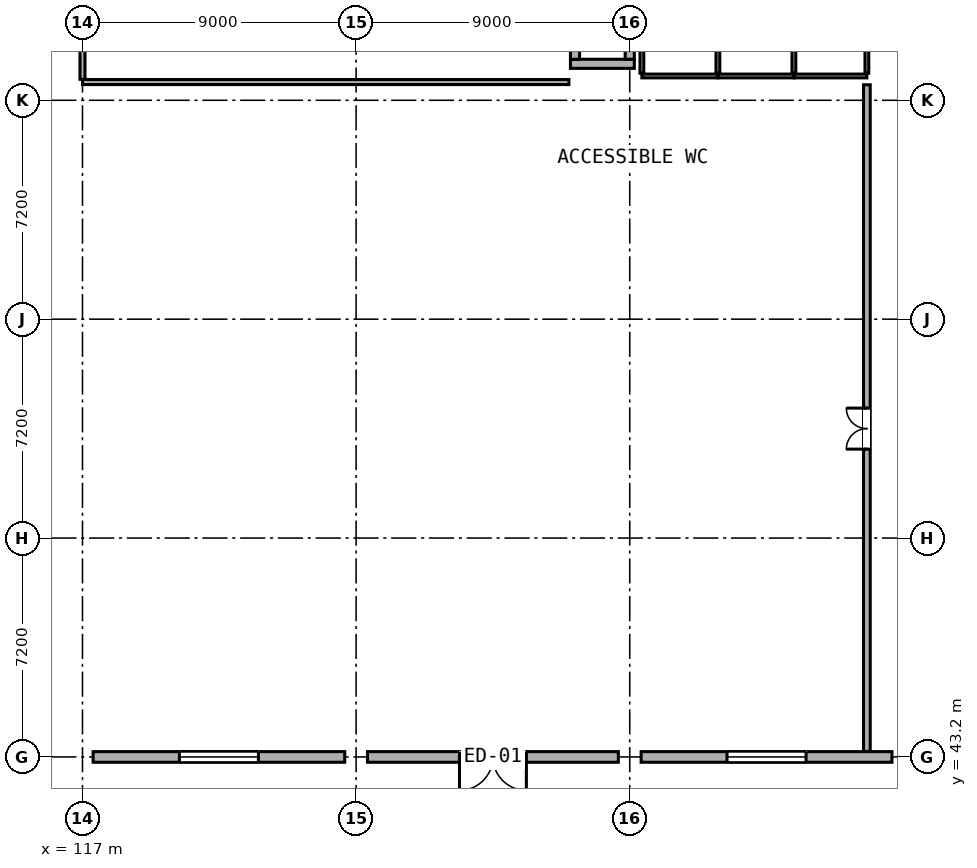
"""IFC4 building model, lengths in metres.
Left out: names, types, materials, properties, quantities, classifications, styles, units other than length and angle.
Written with IfcOpenShell. Run it as: python <this file> out.ifc"""

import sys

from ifc_helpers import new_model, si_unit, direction, frame, frame_2d, origin, origin_2d, place, context, subcontext, project, spatial, rectangle, hollow_rectangle, extrude, element, fill, save


model = new_model("IFC4")
c1 = context("Model", 3, precision=1e-05, world=origin(), true_north=direction((0.0, 1.0)))
c2 = subcontext(c1, "Body", "Model", "MODEL_VIEW")
j1 = project(units=[si_unit("LENGTHUNIT", "METRE"), si_unit("PLANEANGLEUNIT", "RADIAN")], contexts=[c1])
p1 = place(None, origin())
s1 = spatial("IfcSite", under=j1, at=p1, CompositionType="ELEMENT")
p2 = place(p1, origin())
s2 = spatial("IfcBuilding", under=s1, at=p2, CompositionType="ELEMENT")
p3 = place(p2, origin())
s3 = spatial("IfcBuildingStorey", under=s2, at=p3, CompositionType="ELEMENT", Elevation=0.0)
for number, where, z_axis, x_axis in (
    (1, (117.0, 43.2, 0.0), (0.0, 0.0, 1.0), (1.0, 0.0, 0.0)),
    (2, (117.0, 50.4, 0.0), (0.0, 0.0, 1.0), (1.0, 0.0, 0.0)),
    (3, (117.0, 57.6, 0.0), (0.0, 0.0, 1.0), (1.0, 0.0, 0.0)),
    (4, (117.0, 64.8, 0.0), (0.0, 0.0, 1.0), (1.0, 0.0, 0.0)),
):
    element("IfcColumn", number, at=place(p3, frame(where, z_axis=z_axis, x_axis=x_axis)), inside=s3, PredefinedType="COLUMN", context=c2, shape_type="SweptSolid", body=[
        extrude(hollow_rectangle(XDim=0.7, YDim=0.7, WallThickness=0.028, at=origin_2d()), origin(), (0.0, 0.0, 1.0), 4.8),
    ])
for number, where, z_axis, x_axis in (
    (5, (126.0, 43.2, 0.0), (0.0, 0.0, 1.0), (1.0, 0.0, 0.0)),
    (6, (126.0, 50.4, 0.0), (0.0, 0.0, 1.0), (1.0, 0.0, 0.0)),
    (7, (126.0, 57.6, 0.0), (0.0, 0.0, 1.0), (1.0, 0.0, 0.0)),
    (8, (126.0, 64.8, 0.0), (0.0, 0.0, 1.0), (1.0, 0.0, 0.0)),
    (9, (135.0, 43.2, 0.0), (0.0, 0.0, 1.0), (1.0, 0.0, 0.0)),
    (10, (135.0, 50.4, 0.0), (0.0, 0.0, 1.0), (1.0, 0.0, 0.0)),
    (11, (135.0, 57.6, 0.0), (0.0, 0.0, 1.0), (1.0, 0.0, 0.0)),
    (12, (135.0, 64.8, 0.0), (0.0, 0.0, 1.0), (1.0, 0.0, 0.0)),
    (13, (144.0, 43.2, 0.0), (0.0, 0.0, 1.0), (1.0, 0.0, 0.0)),
    (14, (144.0, 50.4, 0.0), (0.0, 0.0, 1.0), (1.0, 0.0, 0.0)),
    (15, (144.0, 57.6, 0.0), (0.0, 0.0, 1.0), (1.0, 0.0, 0.0)),
    (16, (144.0, 64.8, 0.0), (0.0, 0.0, 1.0), (1.0, 0.0, 0.0)),
):
    element("IfcColumn", number, at=place(p3, frame(where, z_axis=z_axis, x_axis=x_axis)), inside=s3, PredefinedType="COLUMN", context=c2, shape_type="SweptSolid", body=[
        extrude(hollow_rectangle(XDim=0.75, YDim=0.75, WallThickness=0.032, at=origin_2d()), origin(), (0.0, 0.0, 1.0), 4.8),
    ])
p4 = place(p3, frame((117.35, 43.2, 0.0), z_axis=(0.0, 0.0, 1.0), x_axis=(1.0, 0.0, 0.0)))
e17 = element("IfcWall", 17, at=p4, inside=s3, PredefinedType="STANDARD", context=c2, shape_type="SweptSolid", body=[
    extrude(rectangle(XDim=8.275, YDim=0.35, at=frame_2d((4.137, 0.0))), origin(), (0.0, 0.0, 1.0), 4.055),
])
p5 = place(p4, frame((2.837, 0.0, 0.85)))
e18 = element("IfcOpeningElement", 18, at=p5, cuts=e17, PredefinedType="OPENING", context=c2, shape_type="SweptSolid", body=[
    extrude(rectangle(XDim=2.6, YDim=1.6, at=frame_2d((1.3, 0.8))), frame((0.0, 0.187, 0.0), z_axis=(0.0, -1.0, 0.0), x_axis=(1.0, 0.0, 0.0)), (0.0, 0.0, 1.0), 0.374),
])
p6 = place(p3, frame((126.375, 43.2, 0.0), z_axis=(0.0, 0.0, 1.0), x_axis=(1.0, 0.0, 0.0)))
e19 = element("IfcWall", 19, at=p6, inside=s3, PredefinedType="STANDARD", context=c2, shape_type="SweptSolid", body=[
    extrude(rectangle(XDim=8.25, YDim=0.35, at=frame_2d((4.125, 0.0))), origin(), (0.0, 0.0, 1.0), 4.055),
])
p7 = place(p6, frame((3.025, 0.0, 0.0)))
e20 = element("IfcOpeningElement", 20, at=p7, cuts=e19, PredefinedType="OPENING", context=c2, shape_type="SweptSolid", body=[
    extrude(rectangle(XDim=2.2, YDim=2.5, at=frame_2d((1.1, 1.25))), frame((0.0, 0.187, 0.0), z_axis=(0.0, -1.0, 0.0), x_axis=(1.0, 0.0, 0.0)), (0.0, 0.0, 1.0), 0.374),
])
p8 = place(p3, frame((135.375, 43.2, 0.0), z_axis=(0.0, 0.0, 1.0), x_axis=(1.0, 0.0, 0.0)))
e21 = element("IfcWall", 21, at=p8, inside=s3, PredefinedType="STANDARD", context=c2, shape_type="SweptSolid", body=[
    extrude(rectangle(XDim=8.25, YDim=0.35, at=frame_2d((4.125, 0.0))), origin(), (0.0, 0.0, 1.0), 4.055),
])
p9 = place(p8, frame((2.825, 0.0, 0.85)))
e22 = element("IfcOpeningElement", 22, at=p9, cuts=e21, PredefinedType="OPENING", context=c2, shape_type="SweptSolid", body=[
    extrude(rectangle(XDim=2.6, YDim=1.6, at=frame_2d((1.3, 0.8))), frame((0.0, 0.187, 0.0), z_axis=(0.0, -1.0, 0.0), x_axis=(1.0, 0.0, 0.0)), (0.0, 0.0, 1.0), 0.374),
])
p10 = place(p3, frame((133.05, 66.0, 0.0), z_axis=(0.0, 0.0, 1.0), x_axis=(1.0, 0.0, 0.0)))
e23 = element("IfcWall", 23, at=p10, inside=s3, PredefinedType="SHEAR", context=c2, shape_type="SweptSolid", body=[
    extrude(rectangle(XDim=2.1, YDim=0.3, at=frame_2d((1.05, 0.0))), origin(), (0.0, 0.0, 1.0), 4.555),
])
for number, where, z_axis, x_axis in (
    (24, (133.2, 66.15, 0.0), (0.0, 0.0, 1.0), (0.0, 1.0, 0.0)),
    (25, (135.0, 66.15, 0.0), (0.0, 0.0, 1.0), (0.0, 1.0, 0.0)),
):
    element("IfcWall", number, at=place(p3, frame(where, z_axis=z_axis, x_axis=x_axis)), inside=s3, PredefinedType="SHEAR", context=c2, shape_type="SweptSolid", body=[
        extrude(rectangle(XDim=1.9, YDim=0.3, at=frame_2d((0.95, 0.0))), origin(), (0.0, 0.0, 1.0), 4.555),
    ])
p11 = place(p3, frame((135.4, 65.6, 0.0), z_axis=(0.0, 0.0, 1.0), x_axis=(1.0, 0.0, 0.0)))
e26 = element("IfcWall", 26, at=p11, inside=s3, PredefinedType="PARTITIONING", context=c2, shape_type="SweptSolid", body=[
    extrude(rectangle(XDim=2.5, YDim=0.125, at=frame_2d((1.25, 0.0))), origin(), (0.0, 0.0, 1.0), 4.555),
])
for number, where, z_axis, x_axis in (
    (27, (135.4, 65.69, 0.0), (0.0, 0.0, 1.0), (0.0, 1.0, 0.0)),
    (28, (137.9, 65.69, 0.0), (0.0, 0.0, 1.0), (0.0, 1.0, 0.0)),
):
    element("IfcWall", number, at=place(p3, frame(where, z_axis=z_axis, x_axis=x_axis)), inside=s3, PredefinedType="PARTITIONING", context=c2, shape_type="SweptSolid", body=[
        extrude(rectangle(XDim=3.42, YDim=0.125, at=frame_2d((1.71, 0.0))), origin(), (0.0, 0.0, 1.0), 4.555),
    ])
p12 = place(p3, frame((137.9, 65.6, 0.0), z_axis=(0.0, 0.0, 1.0), x_axis=(1.0, 0.0, 0.0)))
e29 = element("IfcWall", 29, at=p12, inside=s3, PredefinedType="PARTITIONING", context=c2, shape_type="SweptSolid", body=[
    extrude(rectangle(XDim=2.5, YDim=0.125, at=frame_2d((1.25, 0.0))), origin(), (0.0, 0.0, 1.0), 4.555),
])
p13 = place(p3, frame((140.4, 65.69, 0.0), z_axis=(0.0, 0.0, 1.0), x_axis=(0.0, 1.0, 0.0)))
e30 = element("IfcWall", 30, at=p13, inside=s3, PredefinedType="PARTITIONING", context=c2, shape_type="SweptSolid", body=[
    extrude(rectangle(XDim=3.42, YDim=0.125, at=frame_2d((1.71, 0.0))), origin(), (0.0, 0.0, 1.0), 4.555),
])
p14 = place(p3, frame((140.4, 65.6, 0.0), z_axis=(0.0, 0.0, 1.0), x_axis=(1.0, 0.0, 0.0)))
e31 = element("IfcWall", 31, at=p14, inside=s3, PredefinedType="PARTITIONING", context=c2, shape_type="SweptSolid", body=[
    extrude(rectangle(XDim=2.4, YDim=0.125, at=frame_2d((1.2, 0.0))), origin(), (0.0, 0.0, 1.0), 4.555),
])
p15 = place(p3, frame((142.8, 65.69, 0.0), z_axis=(0.0, 0.0, 1.0), x_axis=(0.0, 1.0, 0.0)))
e32 = element("IfcWall", 32, at=p15, inside=s3, PredefinedType="PARTITIONING", context=c2, shape_type="SweptSolid", body=[
    extrude(rectangle(XDim=3.42, YDim=0.125, at=frame_2d((1.71, 0.0))), origin(), (0.0, 0.0, 1.0), 4.555),
])
p16 = place(p3, frame((142.8, 43.38, 0.0), z_axis=(0.0, 0.0, 1.0), x_axis=(0.0, 1.0, 0.0)))
e33 = element("IfcWall", 33, at=p16, inside=s3, PredefinedType="PARTITIONING", context=c2, shape_type="SweptSolid", body=[
    extrude(rectangle(XDim=21.93, YDim=0.22, at=frame_2d((10.965, 0.0))), origin(), (0.0, 0.0, 1.0), 4.555),
])
p17 = place(p16, frame((9.945, 0.0, 0.0)))
e34 = element("IfcOpeningElement", 34, at=p17, cuts=e33, PredefinedType="OPENING", context=c2, shape_type="SweptSolid", body=[
    extrude(rectangle(XDim=1.35, YDim=2.08, at=frame_2d((0.675, 1.04))), frame((0.0, 0.122, 0.0), z_axis=(0.0, -1.0, 0.0), x_axis=(1.0, 0.0, 0.0)), (0.0, 0.0, 1.0), 0.244),
])
p18 = place(p3, frame((117.0, 65.4, 0.0), z_axis=(0.0, 0.0, 1.0), x_axis=(1.0, 0.0, 0.0)))
e35 = element("IfcWall", 35, at=p18, inside=s3, PredefinedType="PARTITIONING", context=c2, shape_type="SweptSolid", body=[
    extrude(rectangle(XDim=16.0, YDim=0.165, at=frame_2d((8.0, 0.0))), origin(), (0.0, 0.0, 1.0), 4.555),
])
p19 = place(p3, frame((117.0, 65.49, 0.0), z_axis=(0.0, 0.0, 1.0), x_axis=(0.0, 1.0, 0.0)))
e36 = element("IfcWall", 36, at=p19, inside=s3, PredefinedType="PARTITIONING", context=c2, shape_type="SweptSolid", body=[
    extrude(rectangle(XDim=8.82, YDim=0.165, at=frame_2d((4.41, 0.0))), origin(), (0.0, 0.0, 1.0), 3.835),
])
p20 = place(p5, origin())
e37 = element("IfcWindow", 37, at=p20, inside=s3, PartitioningType="DOUBLE_PANEL_VERTICAL", PredefinedType="WINDOW", context=c2, shape_type="SweptSolid", body=[
    extrude(rectangle(XDim=2.6, YDim=1.6, at=frame_2d((1.3, 0.8))), frame((0.0, 0.03, 0.0), z_axis=(0.0, -1.0, 0.0), x_axis=(1.0, 0.0, 0.0)), (0.0, 0.0, 1.0), 0.06),
])
fill(e18, e37)
p21 = place(p7, frame((2.2, 0.0, 0.0), z_axis=(0.0, 0.0, 1.0), x_axis=(-1.0, 0.0, 0.0)))
e38 = element("IfcDoor", 38, at=p21, inside=s3, OperationType="DOUBLE_DOOR_SINGLE_SWING", PredefinedType="DOOR", context=c2, shape_type="SweptSolid", body=[
    extrude(rectangle(XDim=2.2, YDim=2.5, at=frame_2d((1.1, 1.25))), frame((0.0, 0.025, 0.0), z_axis=(0.0, -1.0, 0.0), x_axis=(1.0, 0.0, 0.0)), (0.0, 0.0, 1.0), 0.05),
])
fill(e20, e38)
p22 = place(p9, origin())
e39 = element("IfcWindow", 39, at=p22, inside=s3, PartitioningType="DOUBLE_PANEL_VERTICAL", PredefinedType="WINDOW", context=c2, shape_type="SweptSolid", body=[
    extrude(rectangle(XDim=2.6, YDim=1.6, at=frame_2d((1.3, 0.8))), frame((0.0, 0.03, 0.0), z_axis=(0.0, -1.0, 0.0), x_axis=(1.0, 0.0, 0.0)), (0.0, 0.0, 1.0), 0.06),
])
fill(e22, e39)
p23 = place(p17, origin())
e40 = element("IfcDoor", 40, at=p23, inside=s3, OperationType="DOUBLE_DOOR_SINGLE_SWING", PredefinedType="DOOR", context=c2, shape_type="SweptSolid", body=[
    extrude(rectangle(XDim=1.35, YDim=2.08, at=frame_2d((0.675, 1.04))), frame((0.0, 0.025, 0.0), z_axis=(0.0, -1.0, 0.0), x_axis=(1.0, 0.0, 0.0)), (0.0, 0.0, 1.0), 0.05),
])
fill(e34, e40)
save(model, sys.argv[1])
